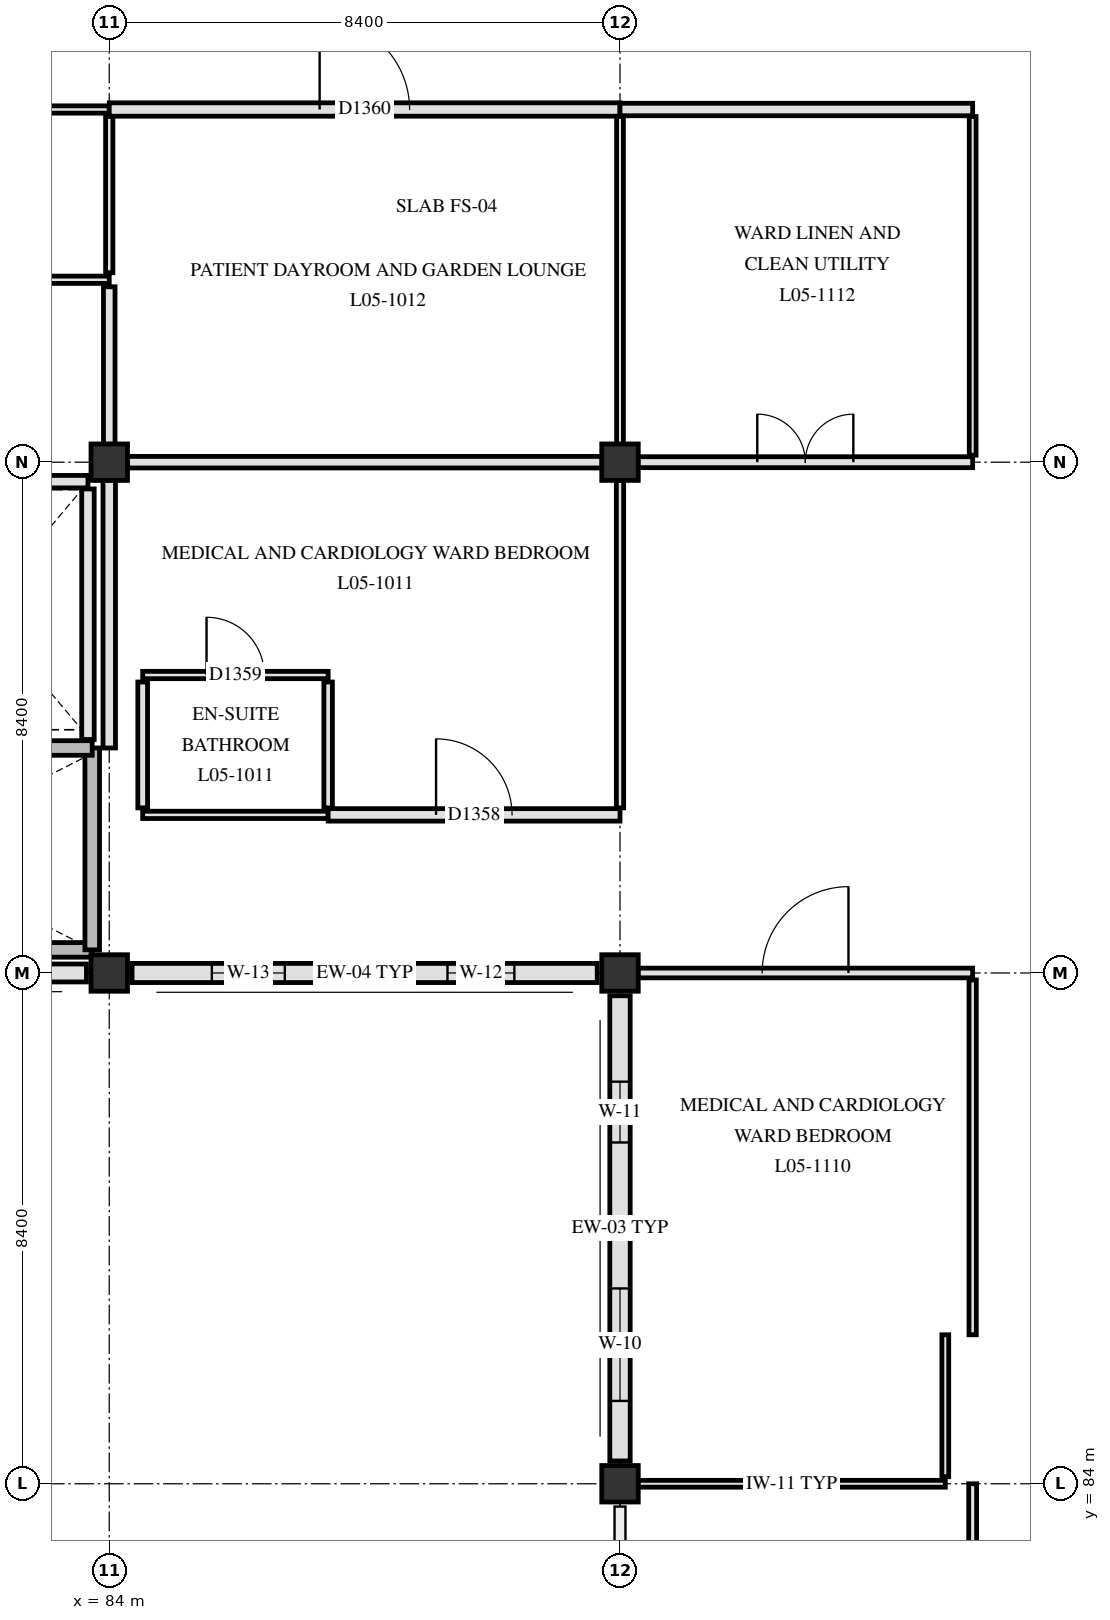
"""IFC4 building model, lengths in metres.
Left out: names, types, materials, properties, quantities, classifications, styles, units other than length and angle.
Written with IfcOpenShell. Run it as: python <this file> out.ifc"""

import sys

from ifc_helpers import new_model, si_unit, direction, frame, frame_2d, origin, origin_2d, place, context, subcontext, project, spatial, rectangle, extrude, element, fill, save


model = new_model("IFC4")
c1 = context("Model", 3, precision=1e-05, world=origin(), true_north=direction((0.0, 1.0)))
c2 = subcontext(c1, "Body", "Model", "MODEL_VIEW")
j1 = project(units=[si_unit("LENGTHUNIT", "METRE"), si_unit("PLANEANGLEUNIT", "RADIAN")], contexts=[c1])
p1 = place(None, origin())
s1 = spatial("IfcSite", under=j1, at=p1, CompositionType="ELEMENT")
p2 = place(p1, origin())
s2 = spatial("IfcBuilding", under=s1, at=p2, CompositionType="ELEMENT")
p3 = place(p2, frame((0.0, 0.0, 22.5)))
s3 = spatial("IfcBuildingStorey", under=s2, at=p3, CompositionType="ELEMENT", Elevation=22.5)
for number, where, z_axis, x_axis in (
    (1, (84.0, 92.4, 0.0), (0.0, 0.0, 1.0), (1.0, 0.0, 0.0)),
    (2, (84.0, 100.8, 0.0), (0.0, 0.0, 1.0), (1.0, 0.0, 0.0)),
    (3, (92.4, 84.0, 0.0), (0.0, 0.0, 1.0), (1.0, 0.0, 0.0)),
    (4, (92.4, 92.4, 0.0), (0.0, 0.0, 1.0), (1.0, 0.0, 0.0)),
    (5, (92.4, 100.8, 0.0), (0.0, 0.0, 1.0), (1.0, 0.0, 0.0)),
):
    element("IfcColumn", number, at=place(p3, frame(where, z_axis=z_axis, x_axis=x_axis)), inside=s3, PredefinedType="COLUMN", context=c2, shape_type="SweptSolid", body=[
        extrude(rectangle(XDim=0.6, YDim=0.6, at=origin_2d()), origin(), (0.0, 0.0, 1.0), 3.9),
    ])
p4 = place(p3, frame((92.4, 84.375, 0.0), z_axis=(0.0, 0.0, 1.0), x_axis=(0.0, 1.0, 0.0)))
e6 = element("IfcWall", 6, at=p4, inside=s3, PredefinedType="SOLIDWALL", context=c2, shape_type="SweptSolid", body=[
    extrude(rectangle(XDim=7.65, YDim=0.335, at=frame_2d((3.825, 0.0))), origin(), (0.0, 0.0, 1.0), 3.34),
])
p5 = place(p4, frame((0.988, 0.0, 0.85)))
e7 = element("IfcOpeningElement", 7, at=p5, cuts=e6, PredefinedType="OPENING", context=c2, shape_type="SweptSolid", body=[
    extrude(rectangle(XDim=1.85, YDim=1.3, at=frame_2d((0.925, 0.65))), frame((0.0, 0.177, 0.0), z_axis=(0.0, -1.0, 0.0), x_axis=(1.0, 0.0, 0.0)), (0.0, 0.0, 1.0), 0.355),
])
p6 = place(p4, frame((5.238, 0.0, 0.85)))
e8 = element("IfcOpeningElement", 8, at=p6, cuts=e6, PredefinedType="OPENING", context=c2, shape_type="SweptSolid", body=[
    extrude(rectangle(XDim=1.0, YDim=1.42, at=frame_2d((0.5, 0.71))), frame((0.0, 0.177, 0.0), z_axis=(0.0, -1.0, 0.0), x_axis=(1.0, 0.0, 0.0)), (0.0, 0.0, 1.0), 0.355),
])
p7 = place(p3, frame((92.025, 92.4, 0.0), z_axis=(0.0, 0.0, 1.0), x_axis=(-1.0, 0.0, 0.0)))
e9 = element("IfcWall", 9, at=p7, inside=s3, PredefinedType="SOLIDWALL", context=c2, shape_type="SweptSolid", body=[
    extrude(rectangle(XDim=7.65, YDim=0.315, at=frame_2d((3.825, 0.0))), origin(), (0.0, 0.0, 1.0), 3.31),
])
p8 = place(p7, frame((1.363, 0.0, 0.85)))
e10 = element("IfcOpeningElement", 10, at=p8, cuts=e9, PredefinedType="OPENING", context=c2, shape_type="SweptSolid", body=[
    extrude(rectangle(XDim=1.1, YDim=1.42, at=frame_2d((0.55, 0.71))), frame((0.0, 0.167, 0.0), z_axis=(0.0, -1.0, 0.0), x_axis=(1.0, 0.0, 0.0)), (0.0, 0.0, 1.0), 0.335),
])
p9 = place(p7, frame((5.137, 0.0, 0.85)))
e11 = element("IfcOpeningElement", 11, at=p9, cuts=e9, PredefinedType="OPENING", context=c2, shape_type="SweptSolid", body=[
    extrude(rectangle(XDim=1.2, YDim=1.42, at=frame_2d((0.6, 0.71))), frame((0.0, 0.167, 0.0), z_axis=(0.0, -1.0, 0.0), x_axis=(1.0, 0.0, 0.0)), (0.0, 0.0, 1.0), 0.335),
])
p10 = place(p3, frame((83.625, 92.4, 0.0), z_axis=(0.0, 0.0, 1.0), x_axis=(-1.0, 0.0, 0.0)))
e12 = element("IfcWall", 12, at=p10, inside=s3, PredefinedType="SOLIDWALL", context=c2, shape_type="SweptSolid", body=[
    extrude(rectangle(XDim=7.65, YDim=0.295, at=frame_2d((3.825, 0.0))), origin(), (0.0, 0.0, 1.0), 3.31),
])
p11 = place(p10, frame((1.262, 0.0, 0.85)))
e13 = element("IfcOpeningElement", 13, at=p11, cuts=e12, PredefinedType="OPENING", context=c2, shape_type="SweptSolid", body=[
    extrude(rectangle(XDim=1.3, YDim=1.42, at=frame_2d((0.65, 0.71))), frame((0.0, 0.157, 0.0), z_axis=(0.0, -1.0, 0.0), x_axis=(1.0, 0.0, 0.0)), (0.0, 0.0, 1.0), 0.315),
])
p12 = place(p10, frame((5.038, 0.0, 0.85)))
e14 = element("IfcOpeningElement", 14, at=p12, cuts=e12, PredefinedType="OPENING", context=c2, shape_type="SweptSolid", body=[
    extrude(rectangle(XDim=1.4, YDim=1.42, at=frame_2d((0.7, 0.71))), frame((0.0, 0.157, 0.0), z_axis=(0.0, -1.0, 0.0), x_axis=(1.0, 0.0, 0.0)), (0.0, 0.0, 1.0), 0.315),
])
p13 = place(p3, frame((75.9, 92.78, 0.0), z_axis=(0.0, 0.0, 1.0), x_axis=(1.0, 0.0, 0.0)))
e15 = element("IfcWall", 15, at=p13, inside=s3, PredefinedType="SHEAR", context=c2, shape_type="SweptSolid", body=[
    extrude(rectangle(XDim=7.82, YDim=0.24, at=frame_2d((3.91, 0.0))), origin(), (0.0, 0.0, 1.0), 3.62),
])
p14 = place(p3, frame((83.72, 92.78, 0.0), z_axis=(0.0, 0.0, 1.0), x_axis=(0.0, 1.0, 0.0)))
e16 = element("IfcWall", 16, at=p14, inside=s3, PredefinedType="SHEAR", context=c2, shape_type="SweptSolid", body=[
    extrude(rectangle(XDim=3.32, YDim=0.24, at=frame_2d((1.66, 0.0))), origin(), (0.0, 0.0, 1.0), 3.62),
])
p15 = place(p3, frame((75.9, 96.1, 0.0), z_axis=(0.0, 0.0, 1.0), x_axis=(1.0, 0.0, 0.0)))
e17 = element("IfcWall", 17, at=p15, inside=s3, PredefinedType="SHEAR", context=c2, shape_type="SweptSolid", body=[
    extrude(rectangle(XDim=7.82, YDim=0.24, at=frame_2d((3.91, 0.0))), origin(), (0.0, 0.0, 1.0), 3.62),
])
p16 = place(p15, frame((0.25, 0.0, 0.0)))
e18 = element("IfcOpeningElement", 18, at=p16, cuts=e17, PredefinedType="OPENING", context=c2, shape_type="SweptSolid", body=[
    extrude(rectangle(XDim=1.45, YDim=2.2, at=frame_2d((0.725, 1.1))), frame((0.0, 0.13, 0.0), z_axis=(0.0, -1.0, 0.0), x_axis=(1.0, 0.0, 0.0)), (0.0, 0.0, 1.0), 0.26),
])
p17 = place(p3, frame((83.65, 96.24, 0.0), z_axis=(0.0, 0.0, 1.0), x_axis=(0.0, 1.0, 0.0)))
e19 = element("IfcWall", 19, at=p17, inside=s3, PredefinedType="PARTITIONING", context=c2, shape_type="SweptSolid", body=[
    extrude(rectangle(XDim=4.12, YDim=0.205, at=frame_2d((2.06, 0.0))), origin(), (0.0, 0.0, 1.0), 3.61),
])
p18 = place(p3, frame((80.08, 100.48, 0.0), z_axis=(0.0, 0.0, 1.0), x_axis=(1.0, 0.0, 0.0)))
e20 = element("IfcWall", 20, at=p18, inside=s3, PredefinedType="PARTITIONING", context=c2, shape_type="SweptSolid", body=[
    extrude(rectangle(XDim=3.57, YDim=0.205, at=frame_2d((1.785, 0.0))), origin(), (0.0, 0.0, 1.0), 3.61),
])
p19 = place(p3, frame((92.695, 84.0, 0.0), z_axis=(0.0, 0.0, 1.0), x_axis=(1.0, 0.0, 0.0)))
e21 = element("IfcWall", 21, at=p19, inside=s3, PredefinedType="PARTITIONING", context=c2, shape_type="SweptSolid", body=[
    extrude(rectangle(XDim=5.055, YDim=0.112, at=frame_2d((2.527, 0.0))), origin(), (0.0, 0.0, 1.0), 3.16),
])
p20 = place(p3, frame((92.695, 92.4, 0.0), z_axis=(0.0, 0.0, 1.0), x_axis=(1.0, 0.0, 0.0)))
e22 = element("IfcWall", 22, at=p20, inside=s3, PredefinedType="PARTITIONING", context=c2, shape_type="SweptSolid", body=[
    extrude(rectangle(XDim=5.505, YDim=0.16, at=frame_2d((2.752, 0.0))), origin(), (0.0, 0.0, 1.0), 3.16),
])
p21 = place(p20, frame((2.042, 0.0, 0.0)))
e23 = element("IfcOpeningElement", 23, at=p21, cuts=e22, PredefinedType="OPENING", context=c2, shape_type="SweptSolid", body=[
    extrude(rectangle(XDim=1.42, YDim=2.22, at=frame_2d((0.71, 1.11))), frame((0.0, 0.09, 0.0), z_axis=(0.0, -1.0, 0.0), x_axis=(1.0, 0.0, 0.0)), (0.0, 0.0, 1.0), 0.18),
])
p22 = place(p3, frame((84.55, 95.0, 0.0), z_axis=(0.0, 0.0, 1.0), x_axis=(1.0, 0.0, 0.0)))
e24 = element("IfcWall", 24, at=p22, inside=s3, PredefinedType="PARTITIONING", context=c2, shape_type="SweptSolid", body=[
    extrude(rectangle(XDim=3.05, YDim=0.12, at=frame_2d((1.525, 0.0))), origin(), (0.0, 0.0, 1.0), 3.61),
])
p23 = place(p3, frame((87.6, 95.0, 0.0), z_axis=(0.0, 0.0, 1.0), x_axis=(1.0, 0.0, 0.0)))
e25 = element("IfcWall", 25, at=p23, inside=s3, PredefinedType="PARTITIONING", context=c2, shape_type="SweptSolid", body=[
    extrude(rectangle(XDim=4.8, YDim=0.205, at=frame_2d((2.4, 0.0))), origin(), (0.0, 0.0, 1.0), 3.3),
])
p24 = place(p23, frame((1.775, 0.0, 0.0)))
e26 = element("IfcOpeningElement", 26, at=p24, cuts=e25, PredefinedType="OPENING", context=c2, shape_type="SweptSolid", body=[
    extrude(rectangle(XDim=1.25, YDim=2.2, at=frame_2d((0.625, 1.1))), frame((0.0, 0.113, 0.0), z_axis=(0.0, -1.0, 0.0), x_axis=(1.0, 0.0, 0.0)), (0.0, 0.0, 1.0), 0.225),
])
p25 = place(p3, frame((84.55, 97.3, 0.0), z_axis=(0.0, 0.0, 1.0), x_axis=(1.0, 0.0, 0.0)))
e27 = element("IfcWall", 27, at=p25, inside=s3, PredefinedType="PARTITIONING", context=c2, shape_type="SweptSolid", body=[
    extrude(rectangle(XDim=3.05, YDim=0.12, at=frame_2d((1.525, 0.0))), origin(), (0.0, 0.0, 1.0), 3.61),
])
p26 = place(p25, frame((1.05, 0.0, 0.0)))
e28 = element("IfcOpeningElement", 28, at=p26, cuts=e27, PredefinedType="OPENING", context=c2, shape_type="SweptSolid", body=[
    extrude(rectangle(XDim=0.95, YDim=2.1, at=frame_2d((0.475, 1.05))), frame((0.0, 0.07, 0.0), z_axis=(0.0, -1.0, 0.0), x_axis=(1.0, 0.0, 0.0)), (0.0, 0.0, 1.0), 0.14),
])
p27 = place(p3, frame((84.295, 100.8, 0.0), z_axis=(0.0, 0.0, 1.0), x_axis=(1.0, 0.0, 0.0)))
e29 = element("IfcWall", 29, at=p27, inside=s3, PredefinedType="PARTITIONING", context=c2, shape_type="SweptSolid", body=[
    extrude(rectangle(XDim=7.81, YDim=0.19, at=frame_2d((3.905, 0.0))), origin(), (0.0, 0.0, 1.0), 3.16),
])
p28 = place(p3, frame((92.695, 100.8, 0.0), z_axis=(0.0, 0.0, 1.0), x_axis=(1.0, 0.0, 0.0)))
e30 = element("IfcWall", 30, at=p28, inside=s3, PredefinedType="PARTITIONING", context=c2, shape_type="SweptSolid", body=[
    extrude(rectangle(XDim=5.505, YDim=0.18, at=frame_2d((2.752, 0.0))), origin(), (0.0, 0.0, 1.0), 3.16),
])
p29 = place(p28, frame((1.962, 0.0, 0.0)))
e31 = element("IfcOpeningElement", 31, at=p29, cuts=e30, PredefinedType="OPENING", context=c2, shape_type="SweptSolid", body=[
    extrude(rectangle(XDim=1.58, YDim=2.22, at=frame_2d((0.79, 1.11))), frame((0.0, 0.1, 0.0), z_axis=(0.0, -1.0, 0.0), x_axis=(1.0, 0.0, 0.0)), (0.0, 0.0, 1.0), 0.2),
])
p30 = place(p3, frame((80.0, 103.8, 0.0), z_axis=(0.0, 0.0, 1.0), x_axis=(1.0, 0.0, 0.0)))
e32 = element("IfcWall", 32, at=p30, inside=s3, PredefinedType="PARTITIONING", context=c2, shape_type="SweptSolid", body=[
    extrude(rectangle(XDim=4.0, YDim=0.12, at=frame_2d((2.0, 0.0))), origin(), (0.0, 0.0, 1.0), 3.3),
])
p31 = place(p30, frame((1.525, 0.0, 0.0)))
e33 = element("IfcOpeningElement", 33, at=p31, cuts=e32, PredefinedType="OPENING", context=c2, shape_type="SweptSolid", body=[
    extrude(rectangle(XDim=0.95, YDim=2.1, at=frame_2d((0.475, 1.05))), frame((0.0, 0.07, 0.0), z_axis=(0.0, -1.0, 0.0), x_axis=(1.0, 0.0, 0.0)), (0.0, 0.0, 1.0), 0.14),
])
p32 = place(p3, frame((80.0, 106.6, 0.0), z_axis=(0.0, 0.0, 1.0), x_axis=(1.0, 0.0, 0.0)))
e34 = element("IfcWall", 34, at=p32, inside=s3, PredefinedType="PARTITIONING", context=c2, shape_type="SweptSolid", body=[
    extrude(rectangle(XDim=4.0, YDim=0.12, at=frame_2d((2.0, 0.0))), origin(), (0.0, 0.0, 1.0), 3.3),
])
p33 = place(p3, frame((84.0, 106.6, 0.0), z_axis=(0.0, 0.0, 1.0), x_axis=(1.0, 0.0, 0.0)))
e35 = element("IfcWall", 35, at=p33, inside=s3, PredefinedType="PARTITIONING", context=c2, shape_type="SweptSolid", body=[
    extrude(rectangle(XDim=8.4, YDim=0.22, at=frame_2d((4.2, 0.0))), origin(), (0.0, 0.0, 1.0), 3.3),
])
p34 = place(p33, frame((3.46, 0.0, 0.0)))
e36 = element("IfcOpeningElement", 36, at=p34, cuts=e35, PredefinedType="OPENING", context=c2, shape_type="SweptSolid", body=[
    extrude(rectangle(XDim=1.48, YDim=2.22, at=frame_2d((0.74, 1.11))), frame((0.0, 0.12, 0.0), z_axis=(0.0, -1.0, 0.0), x_axis=(1.0, 0.0, 0.0)), (0.0, 0.0, 1.0), 0.24),
])
p35 = place(p3, frame((92.4, 106.6, 0.0), z_axis=(0.0, 0.0, 1.0), x_axis=(1.0, 0.0, 0.0)))
e37 = element("IfcWall", 37, at=p35, inside=s3, PredefinedType="PARTITIONING", context=c2, shape_type="SweptSolid", body=[
    extrude(rectangle(XDim=5.8, YDim=0.205, at=frame_2d((2.9, 0.0))), origin(), (0.0, 0.0, 1.0), 3.3),
])
p36 = place(p3, frame((84.0, 96.1, 0.0), z_axis=(0.0, 0.0, 1.0), x_axis=(0.0, 1.0, 0.0)))
e38 = element("IfcWall", 38, at=p36, inside=s3, PredefinedType="PARTITIONING", context=c2, shape_type="SweptSolid", body=[
    extrude(rectangle(XDim=4.405, YDim=0.205, at=frame_2d((2.202, 0.0))), origin(), (0.0, 0.0, 1.0), 3.3),
])
p37 = place(p3, frame((84.0, 101.095, 0.0), z_axis=(0.0, 0.0, 1.0), x_axis=(0.0, 1.0, 0.0)))
e39 = element("IfcWall", 39, at=p37, inside=s3, PredefinedType="PARTITIONING", context=c2, shape_type="SweptSolid", body=[
    extrude(rectangle(XDim=2.59, YDim=0.19, at=frame_2d((1.295, 0.0))), origin(), (0.0, 0.0, 1.0), 3.3),
])
p38 = place(p3, frame((84.0, 103.915, 0.0), z_axis=(0.0, 0.0, 1.0), x_axis=(0.0, 1.0, 0.0)))
e40 = element("IfcWall", 40, at=p38, inside=s3, PredefinedType="PARTITIONING", context=c2, shape_type="SweptSolid", body=[
    extrude(rectangle(XDim=2.57, YDim=0.12, at=frame_2d((1.285, 0.0))), origin(), (0.0, 0.0, 1.0), 3.3),
])
p39 = place(p3, frame((84.55, 95.115, 0.0), z_axis=(0.0, 0.0, 1.0), x_axis=(0.0, 1.0, 0.0)))
e41 = element("IfcWall", 41, at=p39, inside=s3, PredefinedType="PARTITIONING", context=c2, shape_type="SweptSolid", body=[
    extrude(rectangle(XDim=2.07, YDim=0.16, at=frame_2d((1.035, 0.0))), origin(), (0.0, 0.0, 1.0), 3.34),
])
p40 = place(p3, frame((87.6, 95.115, 0.0), z_axis=(0.0, 0.0, 1.0), x_axis=(0.0, 1.0, 0.0)))
e42 = element("IfcWall", 42, at=p40, inside=s3, PredefinedType="PARTITIONING", context=c2, shape_type="SweptSolid", body=[
    extrude(rectangle(XDim=2.07, YDim=0.14, at=frame_2d((1.035, 0.0))), origin(), (0.0, 0.0, 1.0), 3.34),
])
p41 = place(p3, frame((92.4, 95.115, 0.0), z_axis=(0.0, 0.0, 1.0), x_axis=(0.0, 1.0, 0.0)))
e43 = element("IfcWall", 43, at=p41, inside=s3, PredefinedType="PARTITIONING", context=c2, shape_type="SweptSolid", body=[
    extrude(rectangle(XDim=5.39, YDim=0.12, at=frame_2d((2.695, 0.0))), origin(), (0.0, 0.0, 1.0), 3.3),
])
p42 = place(p3, frame((92.4, 101.095, 0.0), z_axis=(0.0, 0.0, 1.0), x_axis=(0.0, 1.0, 0.0)))
e44 = element("IfcWall", 44, at=p42, inside=s3, PredefinedType="PARTITIONING", context=c2, shape_type="SweptSolid", body=[
    extrude(rectangle(XDim=5.39, YDim=0.112, at=frame_2d((2.695, 0.0))), origin(), (0.0, 0.0, 1.0), 3.3),
])
p43 = place(p3, frame((97.75, 84.115, 0.0), z_axis=(0.0, 0.0, 1.0), x_axis=(0.0, 1.0, 0.0)))
e45 = element("IfcWall", 45, at=p43, inside=s3, PredefinedType="PARTITIONING", context=c2, shape_type="SweptSolid", body=[
    extrude(rectangle(XDim=2.335, YDim=0.112, at=frame_2d((1.167, 0.0))), origin(), (0.0, 0.0, 1.0), 3.61),
])
p44 = place(p3, frame((98.2, 78.315, 0.0), z_axis=(0.0, 0.0, 1.0), x_axis=(0.0, 1.0, 0.0)))
e46 = element("IfcWall", 46, at=p44, inside=s3, PredefinedType="PARTITIONING", context=c2, shape_type="SweptSolid", body=[
    extrude(rectangle(XDim=5.685, YDim=0.13, at=frame_2d((2.843, 0.0))), origin(), (0.0, 0.0, 1.0), 3.16),
])
p45 = place(p3, frame((98.2, 86.45, 0.0), z_axis=(0.0, 0.0, 1.0), x_axis=(0.0, 1.0, 0.0)))
e47 = element("IfcWall", 47, at=p45, inside=s3, PredefinedType="PARTITIONING", context=c2, shape_type="SweptSolid", body=[
    extrude(rectangle(XDim=5.835, YDim=0.12, at=frame_2d((2.917, 0.0))), origin(), (0.0, 0.0, 1.0), 3.34),
])
p46 = place(p3, frame((98.2, 100.915, 0.0), z_axis=(0.0, 0.0, 1.0), x_axis=(0.0, 1.0, 0.0)))
e48 = element("IfcWall", 48, at=p46, inside=s3, PredefinedType="PARTITIONING", context=c2, shape_type="SweptSolid", body=[
    extrude(rectangle(XDim=5.57, YDim=0.112, at=frame_2d((2.785, 0.0))), origin(), (0.0, 0.0, 1.0), 3.34),
])
p47 = place(p5, origin())
e49 = element("IfcWindow", 49, at=p47, inside=s3, PartitioningType="SINGLE_PANEL", PredefinedType="WINDOW", context=c2, shape_type="SweptSolid", body=[
    extrude(rectangle(XDim=1.85, YDim=1.3, at=frame_2d((0.925, 0.65))), frame((0.0, 0.03, 0.0), z_axis=(0.0, -1.0, 0.0), x_axis=(1.0, 0.0, 0.0)), (0.0, 0.0, 1.0), 0.06),
])
fill(e7, e49)
p48 = place(p6, origin())
e50 = element("IfcWindow", 50, at=p48, inside=s3, PartitioningType="SINGLE_PANEL", PredefinedType="WINDOW", context=c2, shape_type="SweptSolid", body=[
    extrude(rectangle(XDim=1.0, YDim=1.42, at=frame_2d((0.5, 0.71))), frame((0.0, 0.03, 0.0), z_axis=(0.0, -1.0, 0.0), x_axis=(1.0, 0.0, 0.0)), (0.0, 0.0, 1.0), 0.06),
])
fill(e8, e50)
p49 = place(p8, origin())
e51 = element("IfcWindow", 51, at=p49, inside=s3, PartitioningType="SINGLE_PANEL", PredefinedType="WINDOW", context=c2, shape_type="SweptSolid", body=[
    extrude(rectangle(XDim=1.1, YDim=1.42, at=frame_2d((0.55, 0.71))), frame((0.0, 0.03, 0.0), z_axis=(0.0, -1.0, 0.0), x_axis=(1.0, 0.0, 0.0)), (0.0, 0.0, 1.0), 0.06),
])
fill(e10, e51)
p50 = place(p9, origin())
e52 = element("IfcWindow", 52, at=p50, inside=s3, PartitioningType="SINGLE_PANEL", PredefinedType="WINDOW", context=c2, shape_type="SweptSolid", body=[
    extrude(rectangle(XDim=1.2, YDim=1.42, at=frame_2d((0.6, 0.71))), frame((0.0, 0.03, 0.0), z_axis=(0.0, -1.0, 0.0), x_axis=(1.0, 0.0, 0.0)), (0.0, 0.0, 1.0), 0.06),
])
fill(e11, e52)
p51 = place(p24, origin())
e53 = element("IfcDoor", 53, at=p51, inside=s3, OperationType="SINGLE_SWING_LEFT", PredefinedType="DOOR", context=c2, shape_type="SweptSolid", body=[
    extrude(rectangle(XDim=1.25, YDim=2.2, at=frame_2d((0.625, 1.1))), frame((0.0, 0.025, 0.0), z_axis=(0.0, -1.0, 0.0), x_axis=(1.0, 0.0, 0.0)), (0.0, 0.0, 1.0), 0.05),
])
fill(e26, e53)
p52 = place(p26, origin())
e54 = element("IfcDoor", 54, at=p52, inside=s3, OperationType="SINGLE_SWING_LEFT", PredefinedType="DOOR", context=c2, shape_type="SweptSolid", body=[
    extrude(rectangle(XDim=0.95, YDim=2.1, at=frame_2d((0.475, 1.05))), frame((0.0, 0.025, 0.0), z_axis=(0.0, -1.0, 0.0), x_axis=(1.0, 0.0, 0.0)), (0.0, 0.0, 1.0), 0.05),
])
fill(e28, e54)
p53 = place(p34, origin())
e55 = element("IfcDoor", 55, at=p53, inside=s3, OperationType="SINGLE_SWING_LEFT", PredefinedType="DOOR", context=c2, shape_type="SweptSolid", body=[
    extrude(rectangle(XDim=1.48, YDim=2.22, at=frame_2d((0.74, 1.11))), frame((0.0, 0.025, 0.0), z_axis=(0.0, -1.0, 0.0), x_axis=(1.0, 0.0, 0.0)), (0.0, 0.0, 1.0), 0.05),
])
fill(e36, e55)
p54 = place(p21, origin())
e56 = element("IfcDoor", 56, at=p54, inside=s3, OperationType="SINGLE_SWING_RIGHT", PredefinedType="DOOR", context=c2, shape_type="SweptSolid", body=[
    extrude(rectangle(XDim=1.42, YDim=2.22, at=frame_2d((0.71, 1.11))), frame((0.0, 0.025, 0.0), z_axis=(0.0, -1.0, 0.0), x_axis=(1.0, 0.0, 0.0)), (0.0, 0.0, 1.0), 0.05),
])
fill(e23, e56)
p55 = place(p29, origin())
e57 = element("IfcDoor", 57, at=p55, inside=s3, OperationType="DOUBLE_SWING_LEFT", PredefinedType="DOOR", context=c2, shape_type="SweptSolid", body=[
    extrude(rectangle(XDim=1.58, YDim=2.22, at=frame_2d((0.79, 1.11))), frame((0.0, 0.025, 0.0), z_axis=(0.0, -1.0, 0.0), x_axis=(1.0, 0.0, 0.0)), (0.0, 0.0, 1.0), 0.05),
])
fill(e31, e57)
save(model, sys.argv[1])
